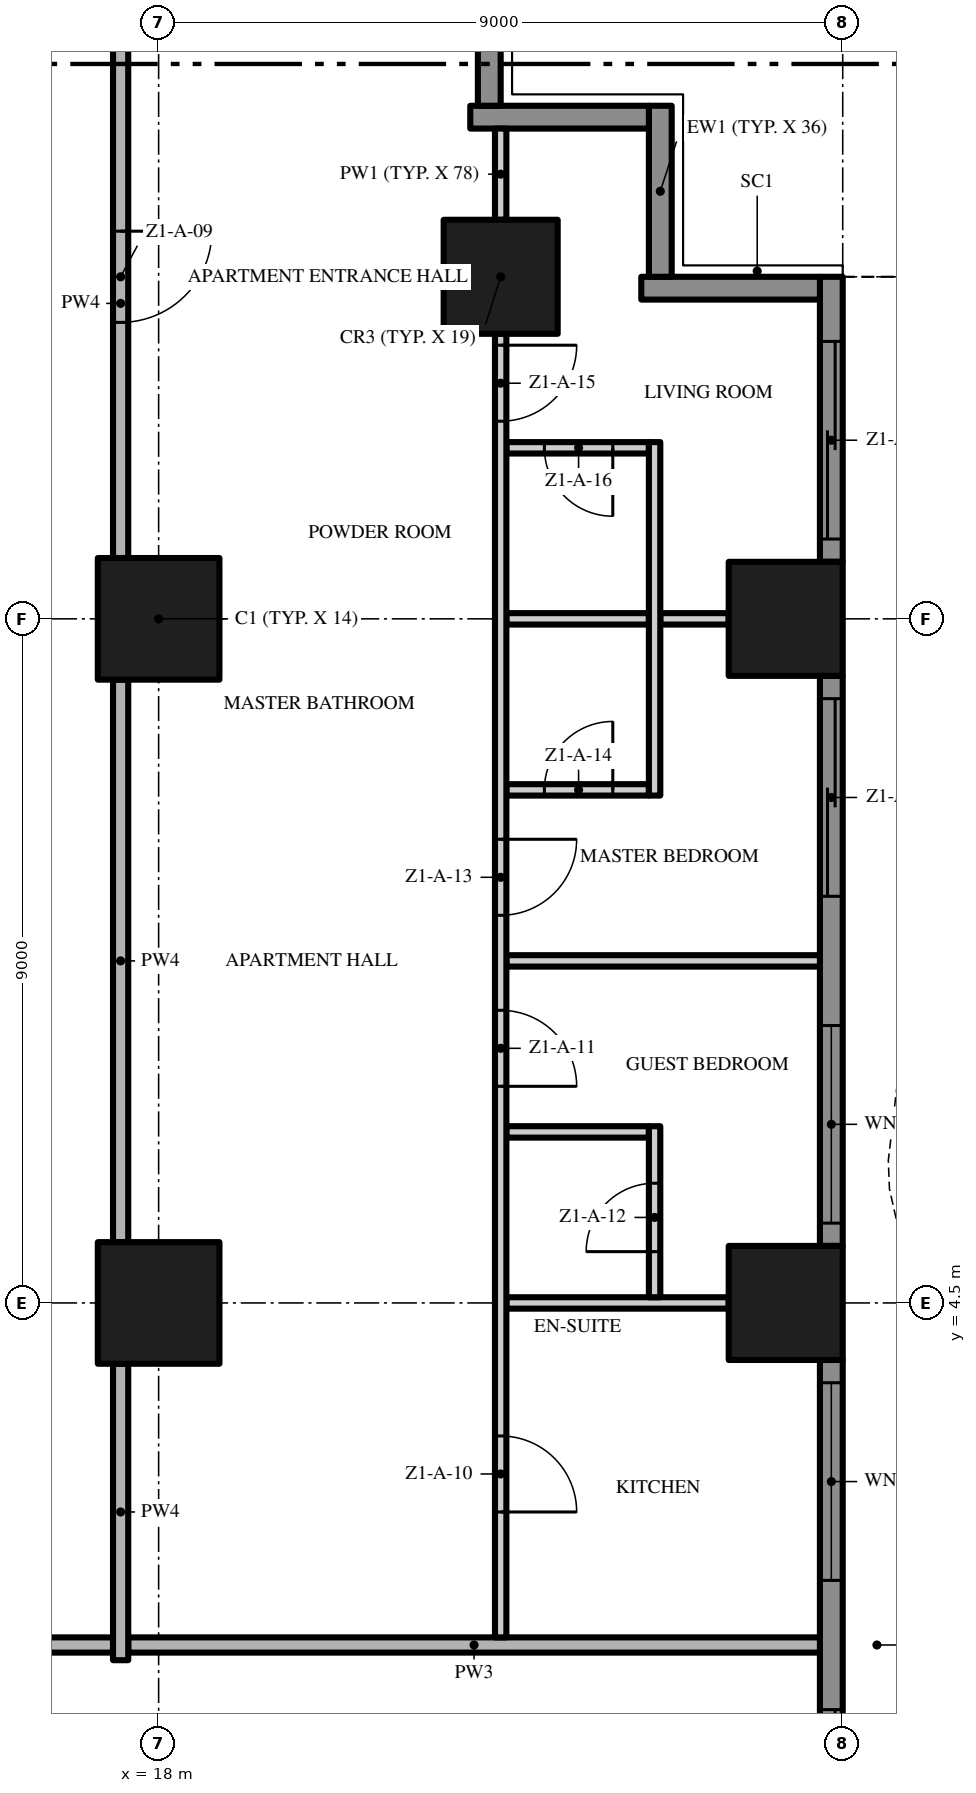
"""IFC4 building model, lengths in metres.
Left out: names, types, materials, properties, quantities, classifications, styles, units other than length and angle.
Written with IfcOpenShell. Run it as: python <this file> out.ifc"""

import sys

from ifc_helpers import new_model, si_unit, direction, frame, frame_2d, origin, origin_2d, place, context, subcontext, project, spatial, polyline, rectangle, outline, extrude, element, fill, save


model = new_model("IFC4")
c1 = context("Model", 3, precision=1e-05, world=origin(), true_north=direction((0.0, 1.0)))
c2 = subcontext(c1, "Body", "Model", "MODEL_VIEW")
j1 = project(units=[si_unit("LENGTHUNIT", "METRE"), si_unit("PLANEANGLEUNIT", "RADIAN")], contexts=[c1])
p1 = place(None, origin())
s1 = spatial("IfcSite", under=j1, at=p1, CompositionType="ELEMENT")
p2 = place(p1, origin())
s2 = spatial("IfcBuilding", under=s1, at=p2, CompositionType="ELEMENT")
p3 = place(p2, frame((0.0, 0.0, 18.8)))
s3 = spatial("IfcBuildingStorey", under=s2, at=p3, CompositionType="ELEMENT", Elevation=18.8)
for number, where, z_axis, x_axis in (
    (1, (18.0, 13.5, 0.0), (0.0, 0.0, 1.0), (1.0, 0.0, 0.0)),
    (2, (18.0, 4.5, 0.0), (0.0, 0.0, 1.0), (1.0, 0.0, 0.0)),
):
    element("IfcColumn", number, at=place(p3, frame(where, z_axis=z_axis, x_axis=x_axis)), inside=s3, PredefinedType="COLUMN", context=c2, shape_type="SweptSolid", body=[
        extrude(rectangle(XDim=1.6, YDim=1.6, at=origin_2d()), origin(), (0.0, 0.0, 1.0), 3.5),
    ])
for number, where, z_axis, x_axis in (
    (3, (26.25, 13.5, 0.0), (0.0, 0.0, 1.0), (1.0, 0.0, 0.0)),
    (4, (22.5, 18.0, 0.0), (0.0, 0.0, 1.0), (1.0, 0.0, 0.0)),
    (5, (26.25, 4.5, 0.0), (0.0, 0.0, 1.0), (1.0, 0.0, 0.0)),
):
    element("IfcColumn", number, at=place(p3, frame(where, z_axis=z_axis, x_axis=x_axis)), inside=s3, PredefinedType="COLUMN", context=c2, shape_type="SweptSolid", body=[
        extrude(rectangle(XDim=1.5, YDim=1.5, at=origin_2d()), origin(), (0.0, 0.0, 1.0), 3.5),
    ])
p4 = place(p3, frame((26.85, 3.75, 0.0), z_axis=(0.0, 0.0, 1.0), x_axis=(0.0, -1.0, 0.0)))
e6 = element("IfcWall", 6, at=p4, inside=s3, PredefinedType="SOLIDWALL", context=c2, shape_type="SweptSolid", body=[
    extrude(rectangle(XDim=7.5, YDim=0.3, at=frame_2d((3.75, 0.0))), origin(), (0.0, 0.0, 1.0), 3.5),
])
p5 = place(p4, frame((4.6, 0.0, 0.0)))
e7 = element("IfcOpeningElement", 7, at=p5, cuts=e6, PredefinedType="OPENING", context=c2, shape_type="SweptSolid", body=[
    extrude(rectangle(XDim=2.6, YDim=2.4, at=frame_2d((1.3, 1.2))), frame((0.0, 0.16, 0.0), z_axis=(0.0, -1.0, 0.0), x_axis=(1.0, 0.0, 0.0)), (0.0, 0.0, 1.0), 0.32),
])
p6 = place(p4, frame((0.3, 0.0, 0.45)))
e8 = element("IfcOpeningElement", 8, at=p6, cuts=e6, PredefinedType="OPENING", context=c2, shape_type="SweptSolid", body=[
    extrude(rectangle(XDim=2.6, YDim=2.65, at=frame_2d((1.3, 1.325))), frame((0.0, 0.16, 0.0), z_axis=(0.0, -1.0, 0.0), x_axis=(1.0, 0.0, 0.0)), (0.0, 0.0, 1.0), 0.32),
])
p7 = place(p3, frame((26.85, 12.75, 0.0), z_axis=(0.0, 0.0, 1.0), x_axis=(0.0, -1.0, 0.0)))
e9 = element("IfcWall", 9, at=p7, inside=s3, PredefinedType="SOLIDWALL", context=c2, shape_type="SweptSolid", body=[
    extrude(rectangle(XDim=7.5, YDim=0.3, at=frame_2d((3.75, 0.0))), origin(), (0.0, 0.0, 1.0), 3.5),
])
p8 = place(p7, frame((4.6, 0.0, 0.45)))
e10 = element("IfcOpeningElement", 10, at=p8, cuts=e9, PredefinedType="OPENING", context=c2, shape_type="SweptSolid", body=[
    extrude(rectangle(XDim=2.6, YDim=2.65, at=frame_2d((1.3, 1.325))), frame((0.0, 0.16, 0.0), z_axis=(0.0, -1.0, 0.0), x_axis=(1.0, 0.0, 0.0)), (0.0, 0.0, 1.0), 0.32),
])
p9 = place(p7, frame((0.3, 0.0, 0.0)))
e11 = element("IfcOpeningElement", 11, at=p9, cuts=e9, PredefinedType="OPENING", context=c2, shape_type="SweptSolid", body=[
    extrude(rectangle(XDim=2.6, YDim=2.4, at=frame_2d((1.3, 1.2))), frame((0.0, 0.16, 0.0), z_axis=(0.0, -1.0, 0.0), x_axis=(1.0, 0.0, 0.0)), (0.0, 0.0, 1.0), 0.32),
])
p10 = place(p3, frame((26.85, 18.0, 0.0), z_axis=(0.0, 0.0, 1.0), x_axis=(0.0, -1.0, 0.0)))
e12 = element("IfcWall", 12, at=p10, inside=s3, PredefinedType="SOLIDWALL", context=c2, shape_type="SweptSolid", body=[
    extrude(rectangle(XDim=3.75, YDim=0.3, at=frame_2d((1.875, 0.0))), origin(), (0.0, 0.0, 1.0), 3.5),
])
p11 = place(p10, frame((0.85, 0.0, 0.0)))
e13 = element("IfcOpeningElement", 13, at=p11, cuts=e12, PredefinedType="OPENING", context=c2, shape_type="SweptSolid", body=[
    extrude(rectangle(XDim=2.6, YDim=2.4, at=frame_2d((1.3, 1.2))), frame((0.0, 0.16, 0.0), z_axis=(0.0, -1.0, 0.0), x_axis=(1.0, 0.0, 0.0)), (0.0, 0.0, 1.0), 0.32),
])
p12 = place(p3, frame((24.35, 17.85, 0.0), z_axis=(0.0, 0.0, 1.0), x_axis=(1.0, 0.0, 0.0)))
e14 = element("IfcWall", 14, at=p12, inside=s3, PredefinedType="SOLIDWALL", context=c2, shape_type="SweptSolid", body=[
    extrude(rectangle(XDim=2.35, YDim=0.3, at=frame_2d((1.175, 0.0))), origin(), (0.0, 0.0, 1.0), 3.5),
])
p13 = place(p3, frame((24.6, 20.25, 0.0), z_axis=(0.0, 0.0, 1.0), x_axis=(0.0, -1.0, 0.0)))
e15 = element("IfcWall", 15, at=p13, inside=s3, PredefinedType="SOLIDWALL", context=c2, shape_type="SweptSolid", body=[
    extrude(rectangle(XDim=2.25, YDim=0.3, at=frame_2d((1.125, 0.0))), origin(), (0.0, 0.0, 1.0), 3.5),
])
p14 = place(p3, frame((22.1, 20.1, 0.0), z_axis=(0.0, 0.0, 1.0), x_axis=(1.0, 0.0, 0.0)))
e16 = element("IfcWall", 16, at=p14, inside=s3, PredefinedType="SOLIDWALL", context=c2, shape_type="SweptSolid", body=[
    extrude(rectangle(XDim=2.35, YDim=0.3, at=frame_2d((1.175, 0.0))), origin(), (0.0, 0.0, 1.0), 3.5),
])
p15 = place(p3, frame((22.35, 22.5, 0.0), z_axis=(0.0, 0.0, 1.0), x_axis=(0.0, -1.0, 0.0)))
e17 = element("IfcWall", 17, at=p15, inside=s3, PredefinedType="SOLIDWALL", context=c2, shape_type="SweptSolid", body=[
    extrude(rectangle(XDim=2.25, YDim=0.3, at=frame_2d((1.125, 0.0))), origin(), (0.0, 0.0, 1.0), 3.5),
])
p16 = place(p3, origin())
e18 = element("IfcWall", 18, at=p16, inside=s3, PredefinedType="USERDEFINED", context=c2, shape_type="SweptSolid", body=[
    extrude(outline(polyline([(29.649, -18.0), (29.985, -16.5), (30.0, -16.125), (29.869, -15.0), (29.345, -13.5), (28.612, -12.0), (27.951, -10.5), (27.615, -9.0), (27.6, -8.625), (27.731, -7.5), (28.255, -6.0), (28.988, -4.5), (29.649, -3.0), (29.985, -1.5), (30.0, -1.125), (29.869, 0.0), (29.345, 1.5), (28.612, 3.0), (27.951, 4.5), (27.615, 6.0), (27.6, 6.375), (27.731, 7.5), (28.255, 9.0), (28.988, 10.5), (29.649, 12.0), (29.985, 13.5), (30.0, 13.875), (29.869, 15.0), (29.345, 16.5), (28.612, 18.0), (28.388, 17.89), (29.114, 16.404), (29.624, 14.944), (29.749, 13.865), (29.736, 13.533), (29.41, 12.079), (28.761, 10.605), (28.024, 9.096), (27.486, 7.556), (27.349, 6.385), (27.366, 5.967), (27.713, 4.421), (28.385, 2.895), (29.114, 1.404), (29.624, -0.056), (29.749, -1.135), (29.736, -1.467), (29.41, -2.921), (28.761, -4.395), (28.024, -5.904), (27.486, -7.444), (27.349, -8.615), (27.366, -9.033), (27.713, -10.579), (28.385, -12.105), (29.114, -13.596), (29.624, -15.056), (29.749, -16.135), (29.736, -16.467), (29.405, -17.945), (29.649, -18.0)])), origin(), (0.0, 0.0, 1.0), 0.9),
])
p17 = place(p3, frame((17.4, 0.0, 0.0), z_axis=(0.0, 0.0, 1.0), x_axis=(-1.0, 0.0, 0.0)))
e19 = element("IfcWall", 19, at=p17, inside=s3, PredefinedType="PARTITIONING", context=c2, shape_type="SweptSolid", body=[
    extrude(rectangle(XDim=17.3, YDim=0.2, at=frame_2d((8.65, 0.0))), origin(), (0.0, 0.0, 1.0), 3.5),
])
p18 = place(p17, frame((7.65, 0.0, 0.0)))
e20 = element("IfcOpeningElement", 20, at=p18, cuts=e19, PredefinedType="OPENING", context=c2, shape_type="SweptSolid", body=[
    extrude(rectangle(XDim=1.5, YDim=2.4, at=frame_2d((0.75, 1.2))), frame((0.0, 0.11, 0.0), z_axis=(0.0, -1.0, 0.0), x_axis=(1.0, 0.0, 0.0)), (0.0, 0.0, 1.0), 0.22),
])
p19 = place(p3, frame((17.6, 0.0, 0.0), z_axis=(0.0, 0.0, 1.0), x_axis=(1.0, 0.0, 0.0)))
e21 = element("IfcWall", 21, at=p19, inside=s3, PredefinedType="PARTITIONING", context=c2, shape_type="SweptSolid", body=[
    extrude(rectangle(XDim=9.1, YDim=0.2, at=frame_2d((4.55, 0.0))), origin(), (0.0, 0.0, 1.0), 3.5),
])
p20 = place(p3, frame((22.575, 4.5, 0.0), z_axis=(0.0, 0.0, 1.0), x_axis=(1.0, 0.0, 0.0)))
e22 = element("IfcWall", 22, at=p20, inside=s3, PredefinedType="PARTITIONING", context=c2, shape_type="SweptSolid", body=[
    extrude(rectangle(XDim=2.925, YDim=0.15, at=frame_2d((1.462, 0.0))), origin(), (0.0, 0.0, 1.0), 3.5),
])
p21 = place(p3, frame((22.575, 6.75, 0.0), z_axis=(0.0, 0.0, 1.0), x_axis=(1.0, 0.0, 0.0)))
e23 = element("IfcWall", 23, at=p21, inside=s3, PredefinedType="PARTITIONING", context=c2, shape_type="SweptSolid", body=[
    extrude(rectangle(XDim=1.875, YDim=0.15, at=frame_2d((0.938, 0.0))), origin(), (0.0, 0.0, 1.0), 3.5),
])
p22 = place(p3, frame((22.575, 9.0, 0.0), z_axis=(0.0, 0.0, 1.0), x_axis=(1.0, 0.0, 0.0)))
e24 = element("IfcWall", 24, at=p22, inside=s3, PredefinedType="PARTITIONING", context=c2, shape_type="SweptSolid", body=[
    extrude(rectangle(XDim=4.125, YDim=0.15, at=frame_2d((2.062, 0.0))), origin(), (0.0, 0.0, 1.0), 3.5),
])
p23 = place(p3, frame((22.575, 11.25, 0.0), z_axis=(0.0, 0.0, 1.0), x_axis=(1.0, 0.0, 0.0)))
e25 = element("IfcWall", 25, at=p23, inside=s3, PredefinedType="PARTITIONING", context=c2, shape_type="SweptSolid", body=[
    extrude(rectangle(XDim=1.875, YDim=0.15, at=frame_2d((0.938, 0.0))), origin(), (0.0, 0.0, 1.0), 3.5),
])
p24 = place(p23, frame((0.5, 0.0, 0.0)))
e26 = element("IfcOpeningElement", 26, at=p24, cuts=e25, PredefinedType="OPENING", context=c2, shape_type="SweptSolid", body=[
    extrude(rectangle(XDim=0.9, YDim=2.1, at=frame_2d((0.45, 1.05))), frame((0.0, 0.085, 0.0), z_axis=(0.0, -1.0, 0.0), x_axis=(1.0, 0.0, 0.0)), (0.0, 0.0, 1.0), 0.17),
])
p25 = place(p3, frame((22.575, 13.5, 0.0), z_axis=(0.0, 0.0, 1.0), x_axis=(1.0, 0.0, 0.0)))
e27 = element("IfcWall", 27, at=p25, inside=s3, PredefinedType="PARTITIONING", context=c2, shape_type="SweptSolid", body=[
    extrude(rectangle(XDim=1.875, YDim=0.15, at=frame_2d((0.938, 0.0))), origin(), (0.0, 0.0, 1.0), 3.5),
])
p26 = place(p3, frame((24.6, 13.5, 0.0), z_axis=(0.0, 0.0, 1.0), x_axis=(1.0, 0.0, 0.0)))
e28 = element("IfcWall", 28, at=p26, inside=s3, PredefinedType="PARTITIONING", context=c2, shape_type="SweptSolid", body=[
    extrude(rectangle(XDim=0.9, YDim=0.15, at=frame_2d((0.45, 0.0))), origin(), (0.0, 0.0, 1.0), 3.5),
])
p27 = place(p3, frame((24.45, 15.75, 0.0), z_axis=(0.0, 0.0, 1.0), x_axis=(-1.0, 0.0, 0.0)))
e29 = element("IfcWall", 29, at=p27, inside=s3, PredefinedType="PARTITIONING", context=c2, shape_type="SweptSolid", body=[
    extrude(rectangle(XDim=1.875, YDim=0.15, at=frame_2d((0.938, 0.0))), origin(), (0.0, 0.0, 1.0), 3.5),
])
p28 = place(p27, frame((0.475, 0.0, 0.0)))
e30 = element("IfcOpeningElement", 30, at=p28, cuts=e29, PredefinedType="OPENING", context=c2, shape_type="SweptSolid", body=[
    extrude(rectangle(XDim=0.9, YDim=2.1, at=frame_2d((0.45, 1.05))), frame((0.0, 0.085, 0.0), z_axis=(0.0, -1.0, 0.0), x_axis=(1.0, 0.0, 0.0)), (0.0, 0.0, 1.0), 0.17),
])
p29 = place(p3, frame((17.5, -0.2, 0.0), z_axis=(0.0, 0.0, 1.0), x_axis=(0.0, 1.0, 0.0)))
e31 = element("IfcWall", 31, at=p29, inside=s3, PredefinedType="PARTITIONING", context=c2, shape_type="SweptSolid", body=[
    extrude(rectangle(XDim=3.9, YDim=0.2, at=frame_2d((1.95, 0.0))), origin(), (0.0, 0.0, 1.0), 3.5),
])
p30 = place(p3, frame((17.5, 5.3, 0.0), z_axis=(0.0, 0.0, 1.0), x_axis=(0.0, 1.0, 0.0)))
e32 = element("IfcWall", 32, at=p30, inside=s3, PredefinedType="PARTITIONING", context=c2, shape_type="SweptSolid", body=[
    extrude(rectangle(XDim=7.4, YDim=0.2, at=frame_2d((3.7, 0.0))), origin(), (0.0, 0.0, 1.0), 3.5),
])
p31 = place(p3, frame((17.5, 21.0, 0.0), z_axis=(0.0, 0.0, 1.0), x_axis=(0.0, -1.0, 0.0)))
e33 = element("IfcWall", 33, at=p31, inside=s3, PredefinedType="PARTITIONING", context=c2, shape_type="SweptSolid", body=[
    extrude(rectangle(XDim=6.7, YDim=0.2, at=frame_2d((3.35, 0.0))), origin(), (0.0, 0.0, 1.0), 3.5),
])
p32 = place(p31, frame((2.4, 0.0, 0.0)))
e34 = element("IfcOpeningElement", 34, at=p32, cuts=e33, PredefinedType="OPENING", context=c2, shape_type="SweptSolid", body=[
    extrude(rectangle(XDim=1.2, YDim=2.4, at=frame_2d((0.6, 1.2))), frame((0.0, 0.11, 0.0), z_axis=(0.0, -1.0, 0.0), x_axis=(1.0, 0.0, 0.0)), (0.0, 0.0, 1.0), 0.22),
])
p33 = place(p3, frame((22.5, 17.25, 0.0), z_axis=(0.0, 0.0, 1.0), x_axis=(0.0, -1.0, 0.0)))
e35 = element("IfcWall", 35, at=p33, inside=s3, PredefinedType="PARTITIONING", context=c2, shape_type="SweptSolid", body=[
    extrude(rectangle(XDim=17.15, YDim=0.15, at=frame_2d((8.575, 0.0))), origin(), (0.0, 0.0, 1.0), 3.5),
])
p34 = place(p33, frame((14.5, 0.0, 0.0)))
e36 = element("IfcOpeningElement", 36, at=p34, cuts=e35, PredefinedType="OPENING", context=c2, shape_type="SweptSolid", body=[
    extrude(rectangle(XDim=1.0, YDim=2.4, at=frame_2d((0.5, 1.2))), frame((0.0, 0.085, 0.0), z_axis=(0.0, -1.0, 0.0), x_axis=(1.0, 0.0, 0.0)), (0.0, 0.0, 1.0), 0.17),
])
p35 = place(p33, frame((8.9, 0.0, 0.0)))
e37 = element("IfcOpeningElement", 37, at=p35, cuts=e35, PredefinedType="OPENING", context=c2, shape_type="SweptSolid", body=[
    extrude(rectangle(XDim=1.0, YDim=2.4, at=frame_2d((0.5, 1.2))), frame((0.0, 0.085, 0.0), z_axis=(0.0, -1.0, 0.0), x_axis=(1.0, 0.0, 0.0)), (0.0, 0.0, 1.0), 0.17),
])
p36 = place(p33, frame((6.65, 0.0, 0.0)))
e38 = element("IfcOpeningElement", 38, at=p36, cuts=e35, PredefinedType="OPENING", context=c2, shape_type="SweptSolid", body=[
    extrude(rectangle(XDim=1.0, YDim=2.4, at=frame_2d((0.5, 1.2))), frame((0.0, 0.085, 0.0), z_axis=(0.0, -1.0, 0.0), x_axis=(1.0, 0.0, 0.0)), (0.0, 0.0, 1.0), 0.17),
])
p37 = place(p33, frame((0.15, 0.0, 0.0)))
e39 = element("IfcOpeningElement", 39, at=p37, cuts=e35, PredefinedType="OPENING", context=c2, shape_type="SweptSolid", body=[
    extrude(rectangle(XDim=1.0, YDim=2.4, at=frame_2d((0.5, 1.2))), frame((0.0, 0.085, 0.0), z_axis=(0.0, -1.0, 0.0), x_axis=(1.0, 0.0, 0.0)), (0.0, 0.0, 1.0), 0.17),
])
p38 = place(p3, frame((22.5, 18.75, 0.0), z_axis=(0.0, 0.0, 1.0), x_axis=(0.0, 1.0, 0.0)))
e40 = element("IfcWall", 40, at=p38, inside=s3, PredefinedType="PARTITIONING", context=c2, shape_type="SweptSolid", body=[
    extrude(rectangle(XDim=1.2, YDim=0.15, at=frame_2d((0.6, 0.0))), origin(), (0.0, 0.0, 1.0), 3.5),
])
p39 = place(p3, frame((24.525, 4.575, 0.0), z_axis=(0.0, 0.0, 1.0), x_axis=(0.0, 1.0, 0.0)))
e41 = element("IfcWall", 41, at=p39, inside=s3, PredefinedType="PARTITIONING", context=c2, shape_type="SweptSolid", body=[
    extrude(rectangle(XDim=2.25, YDim=0.15, at=frame_2d((1.125, 0.0))), origin(), (0.0, 0.0, 1.0), 3.5),
])
p40 = place(p39, frame((0.6, 0.0, 0.0)))
e42 = element("IfcOpeningElement", 42, at=p40, cuts=e41, PredefinedType="OPENING", context=c2, shape_type="SweptSolid", body=[
    extrude(rectangle(XDim=0.9, YDim=2.1, at=frame_2d((0.45, 1.05))), frame((0.0, 0.085, 0.0), z_axis=(0.0, -1.0, 0.0), x_axis=(1.0, 0.0, 0.0)), (0.0, 0.0, 1.0), 0.17),
])
p41 = place(p3, frame((24.525, 11.175, 0.0), z_axis=(0.0, 0.0, 1.0), x_axis=(0.0, 1.0, 0.0)))
e43 = element("IfcWall", 43, at=p41, inside=s3, PredefinedType="PARTITIONING", context=c2, shape_type="SweptSolid", body=[
    extrude(rectangle(XDim=4.65, YDim=0.15, at=frame_2d((2.325, 0.0))), origin(), (0.0, 0.0, 1.0), 3.5),
])
p42 = place(p5, origin())
e44 = element("IfcDoor", 44, at=p42, inside=s3, OperationType="SINGLE_SWING_LEFT", PredefinedType="DOOR", context=c2, shape_type="SweptSolid", body=[
    extrude(rectangle(XDim=2.6, YDim=2.4, at=frame_2d((1.3, 1.2))), frame((0.0, 0.025, 0.0), z_axis=(0.0, -1.0, 0.0), x_axis=(1.0, 0.0, 0.0)), (0.0, 0.0, 1.0), 0.05),
])
fill(e7, e44)
p43 = place(p6, origin())
e45 = element("IfcWindow", 45, at=p43, inside=s3, PartitioningType="SINGLE_PANEL", PredefinedType="WINDOW", context=c2, shape_type="SweptSolid", body=[
    extrude(rectangle(XDim=2.6, YDim=2.65, at=frame_2d((1.3, 1.325))), frame((0.0, 0.03, 0.0), z_axis=(0.0, -1.0, 0.0), x_axis=(1.0, 0.0, 0.0)), (0.0, 0.0, 1.0), 0.06),
])
fill(e8, e45)
p44 = place(p8, origin())
e46 = element("IfcWindow", 46, at=p44, inside=s3, PartitioningType="SINGLE_PANEL", PredefinedType="WINDOW", context=c2, shape_type="SweptSolid", body=[
    extrude(rectangle(XDim=2.6, YDim=2.65, at=frame_2d((1.3, 1.325))), frame((0.0, 0.03, 0.0), z_axis=(0.0, -1.0, 0.0), x_axis=(1.0, 0.0, 0.0)), (0.0, 0.0, 1.0), 0.06),
])
fill(e10, e46)
p45 = place(p9, origin())
e47 = element("IfcDoor", 47, at=p45, inside=s3, OperationType="SINGLE_SWING_LEFT", PredefinedType="DOOR", context=c2, shape_type="SweptSolid", body=[
    extrude(rectangle(XDim=2.6, YDim=2.4, at=frame_2d((1.3, 1.2))), frame((0.0, 0.025, 0.0), z_axis=(0.0, -1.0, 0.0), x_axis=(1.0, 0.0, 0.0)), (0.0, 0.0, 1.0), 0.05),
])
fill(e11, e47)
p46 = place(p11, origin())
e48 = element("IfcDoor", 48, at=p46, inside=s3, OperationType="SINGLE_SWING_LEFT", PredefinedType="DOOR", context=c2, shape_type="SweptSolid", body=[
    extrude(rectangle(XDim=2.6, YDim=2.4, at=frame_2d((1.3, 1.2))), frame((0.0, 0.025, 0.0), z_axis=(0.0, -1.0, 0.0), x_axis=(1.0, 0.0, 0.0)), (0.0, 0.0, 1.0), 0.05),
])
fill(e13, e48)
p47 = place(p32, origin())
e49 = element("IfcDoor", 49, at=p47, inside=s3, OperationType="SINGLE_SWING_LEFT", PredefinedType="DOOR", context=c2, shape_type="SweptSolid", body=[
    extrude(rectangle(XDim=1.2, YDim=2.4, at=frame_2d((0.6, 1.2))), frame((0.0, 0.025, 0.0), z_axis=(0.0, -1.0, 0.0), x_axis=(1.0, 0.0, 0.0)), (0.0, 0.0, 1.0), 0.05),
])
fill(e34, e49)
p48 = place(p34, origin())
e50 = element("IfcDoor", 50, at=p48, inside=s3, OperationType="SINGLE_SWING_RIGHT", PredefinedType="DOOR", context=c2, shape_type="SweptSolid", body=[
    extrude(rectangle(XDim=1.0, YDim=2.4, at=frame_2d((0.5, 1.2))), frame((0.0, 0.025, 0.0), z_axis=(0.0, -1.0, 0.0), x_axis=(1.0, 0.0, 0.0)), (0.0, 0.0, 1.0), 0.05),
])
fill(e36, e50)
p49 = place(p35, origin())
e51 = element("IfcDoor", 51, at=p49, inside=s3, OperationType="SINGLE_SWING_RIGHT", PredefinedType="DOOR", context=c2, shape_type="SweptSolid", body=[
    extrude(rectangle(XDim=1.0, YDim=2.4, at=frame_2d((0.5, 1.2))), frame((0.0, 0.025, 0.0), z_axis=(0.0, -1.0, 0.0), x_axis=(1.0, 0.0, 0.0)), (0.0, 0.0, 1.0), 0.05),
])
fill(e37, e51)
p50 = place(p40, origin())
e52 = element("IfcDoor", 52, at=p50, inside=s3, OperationType="SINGLE_SWING_LEFT", PredefinedType="DOOR", context=c2, shape_type="SweptSolid", body=[
    extrude(rectangle(XDim=0.9, YDim=2.1, at=frame_2d((0.45, 1.05))), frame((0.0, 0.025, 0.0), z_axis=(0.0, -1.0, 0.0), x_axis=(1.0, 0.0, 0.0)), (0.0, 0.0, 1.0), 0.05),
])
fill(e42, e52)
p51 = place(p36, origin())
e53 = element("IfcDoor", 53, at=p51, inside=s3, OperationType="SINGLE_SWING_LEFT", PredefinedType="DOOR", context=c2, shape_type="SweptSolid", body=[
    extrude(rectangle(XDim=1.0, YDim=2.4, at=frame_2d((0.5, 1.2))), frame((0.0, 0.025, 0.0), z_axis=(0.0, -1.0, 0.0), x_axis=(1.0, 0.0, 0.0)), (0.0, 0.0, 1.0), 0.05),
])
fill(e38, e53)
p52 = place(p24, origin())
e54 = element("IfcDoor", 54, at=p52, inside=s3, OperationType="SINGLE_SWING_RIGHT", PredefinedType="DOOR", context=c2, shape_type="SweptSolid", body=[
    extrude(rectangle(XDim=0.9, YDim=2.1, at=frame_2d((0.45, 1.05))), frame((0.0, 0.025, 0.0), z_axis=(0.0, -1.0, 0.0), x_axis=(1.0, 0.0, 0.0)), (0.0, 0.0, 1.0), 0.05),
])
fill(e26, e54)
p53 = place(p37, origin())
e55 = element("IfcDoor", 55, at=p53, inside=s3, OperationType="SINGLE_SWING_LEFT", PredefinedType="DOOR", context=c2, shape_type="SweptSolid", body=[
    extrude(rectangle(XDim=1.0, YDim=2.4, at=frame_2d((0.5, 1.2))), frame((0.0, 0.025, 0.0), z_axis=(0.0, -1.0, 0.0), x_axis=(1.0, 0.0, 0.0)), (0.0, 0.0, 1.0), 0.05),
])
fill(e39, e55)
p54 = place(p28, origin())
e56 = element("IfcDoor", 56, at=p54, inside=s3, OperationType="SINGLE_SWING_LEFT", PredefinedType="DOOR", context=c2, shape_type="SweptSolid", body=[
    extrude(rectangle(XDim=0.9, YDim=2.1, at=frame_2d((0.45, 1.05))), frame((0.0, 0.025, 0.0), z_axis=(0.0, -1.0, 0.0), x_axis=(1.0, 0.0, 0.0)), (0.0, 0.0, 1.0), 0.05),
])
fill(e30, e56)
save(model, sys.argv[1])
